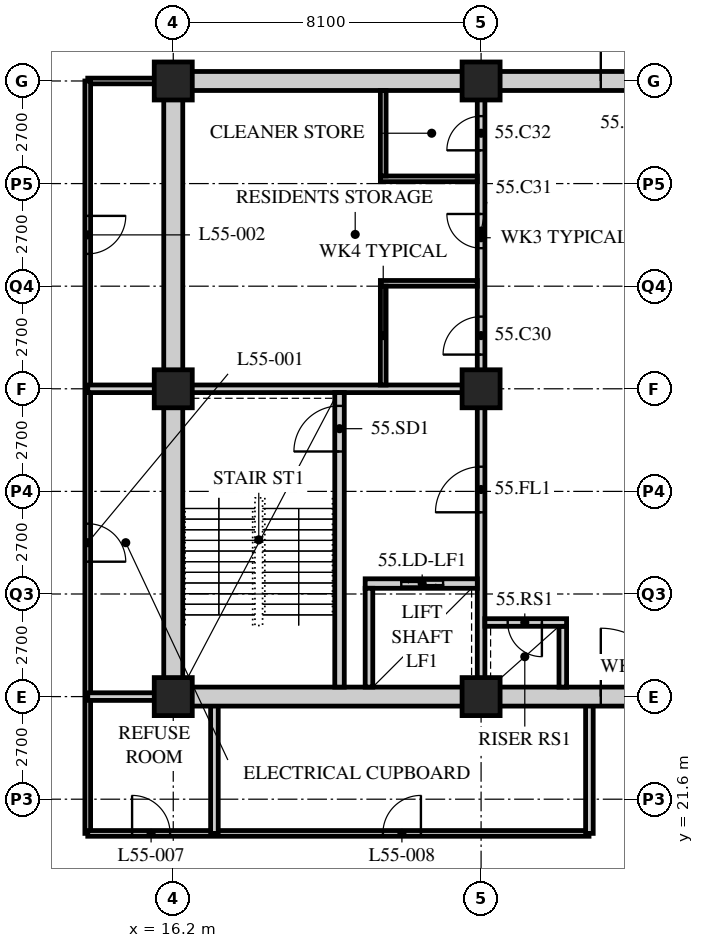
"""IFC4 building model, lengths in metres.
Left out: names, types, materials, properties, quantities, classifications, styles, units other than length and angle.
Written with IfcOpenShell. Run it as: python <this file> out.ifc"""

import sys

from ifc_helpers import new_model, si_unit, direction, frame, frame_2d, origin, origin_2d, place, context, subcontext, project, spatial, rectangle, hollow_rectangle, extrude, element, fill, save


model = new_model("IFC4")
c1 = context("Model", 3, precision=1e-05, world=origin(), true_north=direction((0.0, 1.0)))
c2 = subcontext(c1, "Body", "Model", "MODEL_VIEW")
j1 = project(units=[si_unit("LENGTHUNIT", "METRE"), si_unit("PLANEANGLEUNIT", "RADIAN")], contexts=[c1])
p1 = place(None, origin())
s1 = spatial("IfcSite", under=j1, at=p1, CompositionType="ELEMENT")
p2 = place(p1, origin())
s2 = spatial("IfcBuilding", under=s1, at=p2, CompositionType="ELEMENT")
p3 = place(p2, frame((0.0, 0.0, 213.6)))
s3 = spatial("IfcBuildingStorey", under=s2, at=p3, CompositionType="ELEMENT", Elevation=213.6)
for number, where, z_axis, x_axis in (
    (1, (16.2, 24.3, 0.0), (0.0, 0.0, 1.0), (1.0, 0.0, 0.0)),
    (2, (16.2, 32.4, 0.0), (0.0, 0.0, 1.0), (1.0, 0.0, 0.0)),
    (3, (16.2, 40.5, 0.0), (0.0, 0.0, 1.0), (1.0, 0.0, 0.0)),
    (4, (24.3, 24.3, 0.0), (0.0, 0.0, 1.0), (1.0, 0.0, 0.0)),
    (5, (24.3, 32.4, 0.0), (0.0, 0.0, 1.0), (1.0, 0.0, 0.0)),
    (6, (24.3, 40.5, 0.0), (0.0, 0.0, 1.0), (1.0, 0.0, 0.0)),
):
    element("IfcColumn", number, at=place(p3, frame(where, z_axis=z_axis, x_axis=x_axis)), inside=s3, PredefinedType="COLUMN", context=c2, shape_type="SweptSolid", body=[
        extrude(hollow_rectangle(XDim=1.0, YDim=1.0, WallThickness=0.1, at=origin_2d()), origin(), (0.0, 0.0, 1.0), 3.6),
    ])
p4 = place(p3, frame((16.0, 40.5, 0.0), z_axis=(0.0, 0.0, 1.0), x_axis=(-1.0, 0.0, 0.0)))
e7 = element("IfcWall", 7, at=p4, inside=s3, PredefinedType="PARTITIONING", context=c2, shape_type="SweptSolid", body=[
    extrude(rectangle(XDim=2.05, YDim=0.15, at=frame_2d((1.025, 0.0))), origin(), (0.0, 0.0, 1.0), 3.39),
])
p5 = place(p3, frame((13.95, 40.5, 0.0), z_axis=(0.0, 0.0, 1.0), x_axis=(0.0, -1.0, 0.0)))
e8 = element("IfcWall", 8, at=p5, inside=s3, PredefinedType="PARTITIONING", context=c2, shape_type="SweptSolid", body=[
    extrude(rectangle(XDim=19.8, YDim=0.15, at=frame_2d((9.9, 0.0))), origin(), (0.0, 0.0, 1.0), 3.39),
])
p6 = place(p5, frame((11.65, 0.0, 0.0)))
e9 = element("IfcOpeningElement", 9, at=p6, cuts=e8, PredefinedType="OPENING", context=c2, shape_type="SweptSolid", body=[
    extrude(rectangle(XDim=1.0, YDim=2.1, at=frame_2d((0.5, 1.05))), frame((0.0, 0.085, 0.0), z_axis=(0.0, -1.0, 0.0), x_axis=(1.0, 0.0, 0.0)), (0.0, 0.0, 1.0), 0.17),
])
p7 = place(p5, frame((3.55, 0.0, 0.0)))
e10 = element("IfcOpeningElement", 10, at=p7, cuts=e8, PredefinedType="OPENING", context=c2, shape_type="SweptSolid", body=[
    extrude(rectangle(XDim=1.0, YDim=2.1, at=frame_2d((0.5, 1.05))), frame((0.0, 0.085, 0.0), z_axis=(0.0, -1.0, 0.0), x_axis=(1.0, 0.0, 0.0)), (0.0, 0.0, 1.0), 0.17),
])
p8 = place(p3, frame((13.95, 20.7, 0.0), z_axis=(0.0, 0.0, 1.0), x_axis=(1.0, 0.0, 0.0)))
e11 = element("IfcWall", 11, at=p8, inside=s3, PredefinedType="PARTITIONING", context=c2, shape_type="SweptSolid", body=[
    extrude(rectangle(XDim=13.19, YDim=0.15, at=frame_2d((6.595, 0.0))), origin(), (0.0, 0.0, 1.0), 3.39),
])
p9 = place(p8, frame((1.167, 0.0, 0.0)))
e12 = element("IfcOpeningElement", 12, at=p9, cuts=e11, PredefinedType="OPENING", context=c2, shape_type="SweptSolid", body=[
    extrude(rectangle(XDim=1.0, YDim=2.1, at=frame_2d((0.5, 1.05))), frame((0.0, 0.085, 0.0), z_axis=(0.0, -1.0, 0.0), x_axis=(1.0, 0.0, 0.0)), (0.0, 0.0, 1.0), 0.17),
])
p10 = place(p8, frame((7.767, 0.0, 0.0)))
e13 = element("IfcOpeningElement", 13, at=p10, cuts=e11, PredefinedType="OPENING", context=c2, shape_type="SweptSolid", body=[
    extrude(rectangle(XDim=1.0, YDim=2.1, at=frame_2d((0.5, 1.05))), frame((0.0, 0.085, 0.0), z_axis=(0.0, -1.0, 0.0), x_axis=(1.0, 0.0, 0.0)), (0.0, 0.0, 1.0), 0.17),
])
p11 = place(p3, frame((13.95, 32.4, 0.0), z_axis=(0.0, 0.0, 1.0), x_axis=(1.0, 0.0, 0.0)))
e14 = element("IfcWall", 14, at=p11, inside=s3, PredefinedType="SOLIDWALL", context=c2, shape_type="SweptSolid", body=[
    extrude(rectangle(XDim=2.25, YDim=0.2, at=frame_2d((1.125, 0.0))), origin(), (0.0, 0.0, 1.0), 3.39),
])
for number, where, z_axis, x_axis in (
    (15, (17.283, 20.7, 0.0), (0.0, 0.0, 1.0), (0.0, 1.0, 0.0)),
    (16, (27.15, 20.7, 0.0), (0.0, 0.0, 1.0), (0.0, 1.0, 0.0)),
):
    element("IfcWall", number, at=place(p3, frame(where, z_axis=z_axis, x_axis=x_axis)), inside=s3, PredefinedType="SOLIDWALL", context=c2, shape_type="SweptSolid", body=[
        extrude(rectangle(XDim=3.6, YDim=0.2, at=frame_2d((1.8, 0.0))), origin(), (0.0, 0.0, 1.0), 3.39),
    ])
p12 = place(p3, frame((13.95, 24.3, 0.0), z_axis=(0.0, 0.0, 1.0), x_axis=(1.0, 0.0, 0.0)))
e17 = element("IfcWall", 17, at=p12, inside=s3, PredefinedType="SOLIDWALL", context=c2, shape_type="SweptSolid", body=[
    extrude(rectangle(XDim=2.25, YDim=0.2, at=frame_2d((1.125, 0.0))), origin(), (0.0, 0.0, 1.0), 3.39),
])
p13 = place(p3, frame((15.95, 24.3, 0.0), z_axis=(0.0, 0.0, 1.0), x_axis=(1.0, 0.0, 0.0)))
e18 = element("IfcWall", 18, at=p13, inside=s3, PredefinedType="SOLIDWALL", context=c2, shape_type="SweptSolid", body=[
    extrude(rectangle(XDim=24.8, YDim=0.5, at=frame_2d((12.4, 0.0))), origin(), (0.0, 0.0, 1.0), 2.74),
])
p14 = place(p13, frame((11.5, 0.0, 0.0)))
e19 = element("IfcOpeningElement", 19, at=p14, cuts=e18, PredefinedType="OPENING", context=c2, shape_type="SweptSolid", body=[
    extrude(rectangle(XDim=1.8, YDim=2.4, at=frame_2d((0.9, 1.2))), frame((0.0, 0.26, 0.0), z_axis=(0.0, -1.0, 0.0), x_axis=(1.0, 0.0, 0.0)), (0.0, 0.0, 1.0), 0.52),
])
p15 = place(p3, frame((15.95, 40.5, 0.0), z_axis=(0.0, 0.0, 1.0), x_axis=(1.0, 0.0, 0.0)))
e20 = element("IfcWall", 20, at=p15, inside=s3, PredefinedType="SOLIDWALL", context=c2, shape_type="SweptSolid", body=[
    extrude(rectangle(XDim=24.8, YDim=0.5, at=frame_2d((12.4, 0.0))), origin(), (0.0, 0.0, 1.0), 2.74),
])
p16 = place(p15, frame((11.5, 0.0, 0.0)))
e21 = element("IfcOpeningElement", 21, at=p16, cuts=e20, PredefinedType="OPENING", context=c2, shape_type="SweptSolid", body=[
    extrude(rectangle(XDim=1.8, YDim=2.4, at=frame_2d((0.9, 1.2))), frame((0.0, 0.26, 0.0), z_axis=(0.0, -1.0, 0.0), x_axis=(1.0, 0.0, 0.0)), (0.0, 0.0, 1.0), 0.52),
])
p17 = place(p3, frame((16.2, 24.55, 0.0), z_axis=(0.0, 0.0, 1.0), x_axis=(0.0, 1.0, 0.0)))
e22 = element("IfcWall", 22, at=p17, inside=s3, PredefinedType="SOLIDWALL", context=c2, shape_type="SweptSolid", body=[
    extrude(rectangle(XDim=15.7, YDim=0.5, at=frame_2d((7.85, 0.0))), origin(), (0.0, 0.0, 1.0), 2.778),
])
p18 = place(p3, frame((16.45, 32.4, 0.0), z_axis=(0.0, 0.0, 1.0), x_axis=(1.0, 0.0, 0.0)))
e23 = element("IfcWall", 23, at=p18, inside=s3, PredefinedType="SOLIDWALL", context=c2, shape_type="SweptSolid", body=[
    extrude(rectangle(XDim=7.95, YDim=0.2, at=frame_2d((3.975, 0.0))), origin(), (0.0, 0.0, 1.0), 2.778),
])
p19 = place(p3, frame((24.3, 24.55, 0.0), z_axis=(0.0, 0.0, 1.0), x_axis=(0.0, 1.0, 0.0)))
e24 = element("IfcWall", 24, at=p19, inside=s3, PredefinedType="SOLIDWALL", context=c2, shape_type="SweptSolid", body=[
    extrude(rectangle(XDim=7.75, YDim=0.2, at=frame_2d((3.875, 0.0))), origin(), (0.0, 0.0, 1.0), 2.778),
])
p20 = place(p19, frame((4.6, 0.0, 0.0)))
e25 = element("IfcOpeningElement", 25, at=p20, cuts=e24, PredefinedType="OPENING", context=c2, shape_type="SweptSolid", body=[
    extrude(rectangle(XDim=1.2, YDim=2.1, at=frame_2d((0.6, 1.05))), frame((0.0, 0.11, 0.0), z_axis=(0.0, -1.0, 0.0), x_axis=(1.0, 0.0, 0.0)), (0.0, 0.0, 1.0), 0.22),
])
p21 = place(p3, frame((20.575, 24.55, 0.0), z_axis=(0.0, 0.0, 1.0), x_axis=(0.0, 1.0, 0.0)))
e26 = element("IfcWall", 26, at=p21, inside=s3, PredefinedType="SOLIDWALL", context=c2, shape_type="SweptSolid", body=[
    extrude(rectangle(XDim=7.75, YDim=0.25, at=frame_2d((3.875, 0.0))), origin(), (0.0, 0.0, 1.0), 3.39),
])
p22 = place(p21, frame((6.2, 0.0, 0.0)))
e27 = element("IfcOpeningElement", 27, at=p22, cuts=e26, PredefinedType="OPENING", context=c2, shape_type="SweptSolid", body=[
    extrude(rectangle(XDim=1.2, YDim=2.1, at=frame_2d((0.6, 1.05))), frame((0.0, 0.135, 0.0), z_axis=(0.0, -1.0, 0.0), x_axis=(1.0, 0.0, 0.0)), (0.0, 0.0, 1.0), 0.27),
])
p23 = place(p3, frame((21.25, 27.275, 0.0), z_axis=(0.0, 0.0, 1.0), x_axis=(1.0, 0.0, 0.0)))
e28 = element("IfcWall", 28, at=p23, inside=s3, PredefinedType="SOLIDWALL", context=c2, shape_type="SweptSolid", body=[
    extrude(rectangle(XDim=2.95, YDim=0.25, at=frame_2d((1.475, 0.0))), origin(), (0.0, 0.0, 1.0), 3.39),
])
p24 = place(p23, frame((0.95, 0.0, 0.0)))
e29 = element("IfcOpeningElement", 29, at=p24, cuts=e28, PredefinedType="OPENING", context=c2, shape_type="SweptSolid", body=[
    extrude(rectangle(XDim=1.1, YDim=2.4, at=frame_2d((0.55, 1.2))), frame((0.0, 0.135, 0.0), z_axis=(0.0, -1.0, 0.0), x_axis=(1.0, 0.0, 0.0)), (0.0, 0.0, 1.0), 0.27),
])
p25 = place(p3, frame((21.35, 24.55, 0.0), z_axis=(0.0, 0.0, 1.0), x_axis=(0.0, 1.0, 0.0)))
e30 = element("IfcWall", 30, at=p25, inside=s3, PredefinedType="SOLIDWALL", context=c2, shape_type="SweptSolid", body=[
    extrude(rectangle(XDim=2.6, YDim=0.2, at=frame_2d((1.3, 0.0))), origin(), (0.0, 0.0, 1.0), 3.39),
])
p26 = place(p3, frame((26.45, 24.55, 0.0), z_axis=(0.0, 0.0, 1.0), x_axis=(0.0, 1.0, 0.0)))
e31 = element("IfcWall", 31, at=p26, inside=s3, PredefinedType="SOLIDWALL", context=c2, shape_type="SweptSolid", body=[
    extrude(rectangle(XDim=1.6, YDim=0.2, at=frame_2d((0.8, 0.0))), origin(), (0.0, 0.0, 1.0), 3.39),
])
p27 = place(p3, frame((24.4, 26.25, 0.0), z_axis=(0.0, 0.0, 1.0), x_axis=(1.0, 0.0, 0.0)))
e32 = element("IfcWall", 32, at=p27, inside=s3, PredefinedType="SOLIDWALL", context=c2, shape_type="SweptSolid", body=[
    extrude(rectangle(XDim=2.15, YDim=0.2, at=frame_2d((1.075, 0.0))), origin(), (0.0, 0.0, 1.0), 3.39),
])
p28 = place(p27, frame((0.6, 0.0, 0.0)))
e33 = element("IfcOpeningElement", 33, at=p28, cuts=e32, PredefinedType="OPENING", context=c2, shape_type="SweptSolid", body=[
    extrude(rectangle(XDim=0.9, YDim=2.1, at=frame_2d((0.45, 1.05))), frame((0.0, 0.11, 0.0), z_axis=(0.0, -1.0, 0.0), x_axis=(1.0, 0.0, 0.0)), (0.0, 0.0, 1.0), 0.22),
])
p29 = place(p3, frame((24.3, 32.5, 0.0), z_axis=(0.0, 0.0, 1.0), x_axis=(0.0, 1.0, 0.0)))
e34 = element("IfcWall", 34, at=p29, inside=s3, PredefinedType="PARTITIONING", context=c2, shape_type="SweptSolid", body=[
    extrude(rectangle(XDim=7.75, YDim=0.2, at=frame_2d((3.875, 0.0))), origin(), (0.0, 0.0, 1.0), 2.778),
])
p30 = place(p29, frame((0.8, 0.0, 0.0)))
e35 = element("IfcOpeningElement", 35, at=p30, cuts=e34, PredefinedType="OPENING", context=c2, shape_type="SweptSolid", body=[
    extrude(rectangle(XDim=1.0, YDim=2.1, at=frame_2d((0.5, 1.05))), frame((0.0, 0.11, 0.0), z_axis=(0.0, -1.0, 0.0), x_axis=(1.0, 0.0, 0.0)), (0.0, 0.0, 1.0), 0.22),
])
p31 = place(p29, frame((3.6, 0.0, 0.0)))
e36 = element("IfcOpeningElement", 36, at=p31, cuts=e34, PredefinedType="OPENING", context=c2, shape_type="SweptSolid", body=[
    extrude(rectangle(XDim=0.9, YDim=2.1, at=frame_2d((0.45, 1.05))), frame((0.0, 0.11, 0.0), z_axis=(0.0, -1.0, 0.0), x_axis=(1.0, 0.0, 0.0)), (0.0, 0.0, 1.0), 0.22),
])
p32 = place(p29, frame((6.175, 0.0, 0.0)))
e37 = element("IfcOpeningElement", 37, at=p32, cuts=e34, PredefinedType="OPENING", context=c2, shape_type="SweptSolid", body=[
    extrude(rectangle(XDim=0.9, YDim=2.1, at=frame_2d((0.45, 1.05))), frame((0.0, 0.11, 0.0), z_axis=(0.0, -1.0, 0.0), x_axis=(1.0, 0.0, 0.0)), (0.0, 0.0, 1.0), 0.22),
])
for number, where, z_axis, x_axis in (
    (38, (21.65, 35.175, 0.0), (0.0, 0.0, 1.0), (1.0, 0.0, 0.0)),
    (39, (21.65, 37.925, 0.0), (0.0, 0.0, 1.0), (1.0, 0.0, 0.0)),
):
    element("IfcWall", number, at=place(p3, frame(where, z_axis=z_axis, x_axis=x_axis)), inside=s3, PredefinedType="PARTITIONING", context=c2, shape_type="SweptSolid", body=[
        extrude(rectangle(XDim=2.55, YDim=0.15, at=frame_2d((1.275, 0.0))), origin(), (0.0, 0.0, 1.0), 3.39),
    ])
p33 = place(p3, frame((21.725, 32.5, 0.0), z_axis=(0.0, 0.0, 1.0), x_axis=(0.0, 1.0, 0.0)))
e40 = element("IfcWall", 40, at=p33, inside=s3, PredefinedType="PARTITIONING", context=c2, shape_type="SweptSolid", body=[
    extrude(rectangle(XDim=2.6, YDim=0.15, at=frame_2d((1.3, 0.0))), origin(), (0.0, 0.0, 1.0), 3.39),
])
p34 = place(p3, frame((21.725, 38.0, 0.0), z_axis=(0.0, 0.0, 1.0), x_axis=(0.0, 1.0, 0.0)))
e41 = element("IfcWall", 41, at=p34, inside=s3, PredefinedType="PARTITIONING", context=c2, shape_type="SweptSolid", body=[
    extrude(rectangle(XDim=2.25, YDim=0.15, at=frame_2d((1.125, 0.0))), origin(), (0.0, 0.0, 1.0), 3.39),
])
p35 = place(p6, origin())
e42 = element("IfcDoor", 42, at=p35, inside=s3, OperationType="SINGLE_SWING_RIGHT", PredefinedType="DOOR", context=c2, shape_type="SweptSolid", body=[
    extrude(rectangle(XDim=1.0, YDim=2.1, at=frame_2d((0.5, 1.05))), frame((0.0, 0.025, 0.0), z_axis=(0.0, -1.0, 0.0), x_axis=(1.0, 0.0, 0.0)), (0.0, 0.0, 1.0), 0.05),
])
fill(e9, e42)
p36 = place(p7, origin())
e43 = element("IfcDoor", 43, at=p36, inside=s3, OperationType="SINGLE_SWING_LEFT", PredefinedType="DOOR", context=c2, shape_type="SweptSolid", body=[
    extrude(rectangle(XDim=1.0, YDim=2.1, at=frame_2d((0.5, 1.05))), frame((0.0, 0.025, 0.0), z_axis=(0.0, -1.0, 0.0), x_axis=(1.0, 0.0, 0.0)), (0.0, 0.0, 1.0), 0.05),
])
fill(e10, e43)
p37 = place(p9, origin())
e44 = element("IfcDoor", 44, at=p37, inside=s3, OperationType="SINGLE_SWING_LEFT", PredefinedType="DOOR", context=c2, shape_type="SweptSolid", body=[
    extrude(rectangle(XDim=1.0, YDim=2.1, at=frame_2d((0.5, 1.05))), frame((0.0, 0.025, 0.0), z_axis=(0.0, -1.0, 0.0), x_axis=(1.0, 0.0, 0.0)), (0.0, 0.0, 1.0), 0.05),
])
fill(e12, e44)
p38 = place(p10, origin())
e45 = element("IfcDoor", 45, at=p38, inside=s3, OperationType="SINGLE_SWING_RIGHT", PredefinedType="DOOR", context=c2, shape_type="SweptSolid", body=[
    extrude(rectangle(XDim=1.0, YDim=2.1, at=frame_2d((0.5, 1.05))), frame((0.0, 0.025, 0.0), z_axis=(0.0, -1.0, 0.0), x_axis=(1.0, 0.0, 0.0)), (0.0, 0.0, 1.0), 0.05),
])
fill(e13, e45)
p39 = place(p30, origin())
e46 = element("IfcDoor", 46, at=p39, inside=s3, OperationType="SINGLE_SWING_LEFT", PredefinedType="DOOR", context=c2, shape_type="SweptSolid", body=[
    extrude(rectangle(XDim=1.0, YDim=2.1, at=frame_2d((0.5, 1.05))), frame((0.0, 0.025, 0.0), z_axis=(0.0, -1.0, 0.0), x_axis=(1.0, 0.0, 0.0)), (0.0, 0.0, 1.0), 0.05),
])
fill(e35, e46)
p40 = place(p31, origin())
e47 = element("IfcDoor", 47, at=p40, inside=s3, OperationType="SINGLE_SWING_RIGHT", PredefinedType="DOOR", context=c2, shape_type="SweptSolid", body=[
    extrude(rectangle(XDim=0.9, YDim=2.1, at=frame_2d((0.45, 1.05))), frame((0.0, 0.025, 0.0), z_axis=(0.0, -1.0, 0.0), x_axis=(1.0, 0.0, 0.0)), (0.0, 0.0, 1.0), 0.05),
])
fill(e36, e47)
p41 = place(p32, origin())
e48 = element("IfcDoor", 48, at=p41, inside=s3, OperationType="SINGLE_SWING_LEFT", PredefinedType="DOOR", context=c2, shape_type="SweptSolid", body=[
    extrude(rectangle(XDim=0.9, YDim=2.1, at=frame_2d((0.45, 1.05))), frame((0.0, 0.025, 0.0), z_axis=(0.0, -1.0, 0.0), x_axis=(1.0, 0.0, 0.0)), (0.0, 0.0, 1.0), 0.05),
])
fill(e37, e48)
p42 = place(p22, origin())
e49 = element("IfcDoor", 49, at=p42, inside=s3, OperationType="SINGLE_SWING_LEFT", PredefinedType="DOOR", context=c2, shape_type="SweptSolid", body=[
    extrude(rectangle(XDim=1.2, YDim=2.1, at=frame_2d((0.6, 1.05))), frame((0.0, 0.025, 0.0), z_axis=(0.0, -1.0, 0.0), x_axis=(1.0, 0.0, 0.0)), (0.0, 0.0, 1.0), 0.05),
])
fill(e27, e49)
p43 = place(p20, origin())
e50 = element("IfcDoor", 50, at=p43, inside=s3, OperationType="SINGLE_SWING_LEFT", PredefinedType="DOOR", context=c2, shape_type="SweptSolid", body=[
    extrude(rectangle(XDim=1.2, YDim=2.1, at=frame_2d((0.6, 1.05))), frame((0.0, 0.025, 0.0), z_axis=(0.0, -1.0, 0.0), x_axis=(1.0, 0.0, 0.0)), (0.0, 0.0, 1.0), 0.05),
])
fill(e25, e50)
p44 = place(p28, origin())
e51 = element("IfcDoor", 51, at=p44, inside=s3, OperationType="SINGLE_SWING_LEFT", PredefinedType="DOOR", context=c2, shape_type="SweptSolid", body=[
    extrude(rectangle(XDim=0.9, YDim=2.1, at=frame_2d((0.45, 1.05))), frame((0.0, 0.025, 0.0), z_axis=(0.0, -1.0, 0.0), x_axis=(1.0, 0.0, 0.0)), (0.0, 0.0, 1.0), 0.05),
])
fill(e33, e51)
p45 = place(p24, origin())
e52 = element("IfcDoor", 52, at=p45, inside=s3, OperationType="DOUBLE_DOOR_SLIDING", PredefinedType="DOOR", context=c2, shape_type="SweptSolid", body=[
    extrude(rectangle(XDim=1.1, YDim=2.4, at=frame_2d((0.55, 1.2))), frame((0.0, 0.025, 0.0), z_axis=(0.0, -1.0, 0.0), x_axis=(1.0, 0.0, 0.0)), (0.0, 0.0, 1.0), 0.05),
])
fill(e29, e52)
p46 = place(p14, origin())
e53 = element("IfcDoor", 53, at=p46, inside=s3, OperationType="DOUBLE_DOOR_SINGLE_SWING", PredefinedType="DOOR", context=c2, shape_type="SweptSolid", body=[
    extrude(rectangle(XDim=1.8, YDim=2.4, at=frame_2d((0.9, 1.2))), frame((0.0, 0.025, 0.0), z_axis=(0.0, -1.0, 0.0), x_axis=(1.0, 0.0, 0.0)), (0.0, 0.0, 1.0), 0.05),
])
fill(e19, e53)
p47 = place(p16, origin())
e54 = element("IfcDoor", 54, at=p47, inside=s3, OperationType="DOUBLE_DOOR_SINGLE_SWING", PredefinedType="DOOR", context=c2, shape_type="SweptSolid", body=[
    extrude(rectangle(XDim=1.8, YDim=2.4, at=frame_2d((0.9, 1.2))), frame((0.0, 0.025, 0.0), z_axis=(0.0, -1.0, 0.0), x_axis=(1.0, 0.0, 0.0)), (0.0, 0.0, 1.0), 0.05),
])
fill(e21, e54)
save(model, sys.argv[1])
